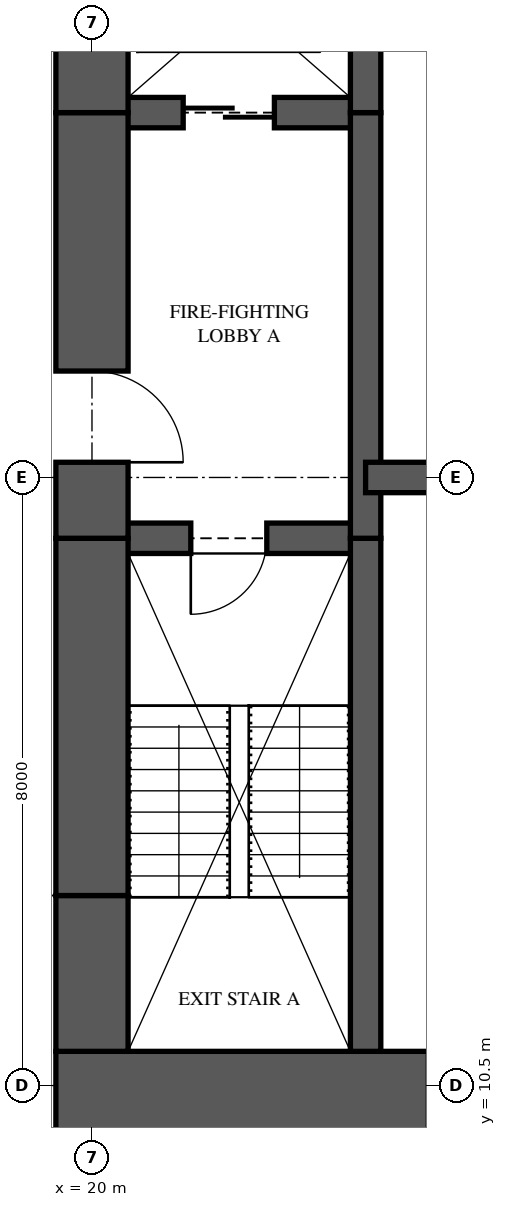
"""IFC4 building model, lengths in metres.
Left out: names, types, materials, properties, quantities, classifications, styles, units other than length and angle.
Written with IfcOpenShell. Run it as: python <this file> out.ifc"""

import sys

from ifc_helpers import new_model, si_unit, direction, frame, frame_2d, origin, place, context, subcontext, project, spatial, rectangle, extrude, element, fill, save


model = new_model("IFC4")
c1 = context("Model", 3, precision=1e-05, world=origin(), true_north=direction((0.0, 1.0)))
c2 = subcontext(c1, "Body", "Model", "MODEL_VIEW")
j1 = project(units=[si_unit("LENGTHUNIT", "METRE"), si_unit("PLANEANGLEUNIT", "RADIAN")], contexts=[c1])
p1 = place(None, origin())
s1 = spatial("IfcSite", under=j1, at=p1, CompositionType="ELEMENT")
p2 = place(p1, origin())
s2 = spatial("IfcBuilding", under=s1, at=p2, CompositionType="ELEMENT")
p3 = place(p2, frame((0.0, 0.0, 54.5)))
s3 = spatial("IfcBuildingStorey", under=s2, at=p3, CompositionType="ELEMENT", Elevation=54.5)
p4 = place(p3, frame((19.525, 10.125, 0.0), z_axis=(0.0, 0.0, 1.0), x_axis=(1.0, 0.0, 0.0)))
e1 = element("IfcWall", 1, at=p4, inside=s3, PredefinedType="SHEAR", context=c2, shape_type="SweptSolid", body=[
    extrude(rectangle(XDim=6.475, YDim=1.65, at=frame_2d((3.238, 0.0))), origin(), (0.0, 0.0, 1.0), 3.35),
])
p5 = place(p4, frame((4.9, 0.0, 0.0)))
e2 = element("IfcOpeningElement", 2, at=p5, cuts=e1, PredefinedType="OPENING", context=c2, shape_type="SweptSolid", body=[
    extrude(rectangle(XDim=0.75, YDim=2.1, at=frame_2d((0.375, 1.05))), frame((0.0, 0.835, 0.0), z_axis=(0.0, -1.0, 0.0), x_axis=(1.0, 0.0, 0.0)), (0.0, 0.0, 1.0), 1.67),
])
p6 = place(p3, frame((20.0, 26.05, 0.0), z_axis=(0.0, 0.0, 1.0), x_axis=(0.0, -1.0, 0.0)))
e3 = element("IfcWall", 3, at=p6, inside=s3, PredefinedType="SHEAR", context=c2, shape_type="SweptSolid", body=[
    extrude(rectangle(XDim=2.75, YDim=0.95, at=frame_2d((1.375, 0.0))), origin(), (0.0, 0.0, 1.0), 3.35),
])
p7 = place(p3, frame((20.0, 23.3, 0.0), z_axis=(0.0, 0.0, 1.0), x_axis=(0.0, -1.0, 0.0)))
e4 = element("IfcWall", 4, at=p7, inside=s3, PredefinedType="SHEAR", context=c2, shape_type="SweptSolid", body=[
    extrude(rectangle(XDim=5.6, YDim=0.95, at=frame_2d((2.8, 0.0))), origin(), (0.0, 0.0, 1.0), 3.35),
])
p8 = place(p7, frame((3.4, 0.0, 0.0)))
e5 = element("IfcOpeningElement", 5, at=p8, cuts=e4, PredefinedType="OPENING", context=c2, shape_type="SweptSolid", body=[
    extrude(rectangle(XDim=1.2, YDim=2.2, at=frame_2d((0.6, 1.1))), frame((0.0, 0.485, 0.0), z_axis=(0.0, -1.0, 0.0), x_axis=(1.0, 0.0, 0.0)), (0.0, 0.0, 1.0), 0.97),
])
p9 = place(p3, frame((20.0, 17.7, 0.0), z_axis=(0.0, 0.0, 1.0), x_axis=(0.0, -1.0, 0.0)))
e6 = element("IfcWall", 6, at=p9, inside=s3, PredefinedType="SHEAR", context=c2, shape_type="SweptSolid", body=[
    extrude(rectangle(XDim=4.7, YDim=0.95, at=frame_2d((2.35, 0.0))), origin(), (0.0, 0.0, 1.0), 3.35),
])
p10 = place(p3, frame((20.0, 13.0, 0.0), z_axis=(0.0, 0.0, 1.0), x_axis=(0.0, -1.0, 0.0)))
e7 = element("IfcWall", 7, at=p10, inside=s3, PredefinedType="SHEAR", context=c2, shape_type="SweptSolid", body=[
    extrude(rectangle(XDim=2.05, YDim=0.95, at=frame_2d((1.025, 0.0))), origin(), (0.0, 0.0, 1.0), 3.35),
])
p11 = place(p3, frame((23.6, 10.95, 0.0), z_axis=(0.0, 0.0, 1.0), x_axis=(0.0, 1.0, 0.0)))
e8 = element("IfcWall", 8, at=p11, inside=s3, PredefinedType="SHEAR", context=c2, shape_type="SweptSolid", body=[
    extrude(rectangle(XDim=6.75, YDim=0.4, at=frame_2d((3.375, 0.0))), origin(), (0.0, 0.0, 1.0), 3.35),
])
p12 = place(p3, frame((23.6, 17.7, 0.0), z_axis=(0.0, 0.0, 1.0), x_axis=(0.0, 1.0, 0.0)))
e9 = element("IfcWall", 9, at=p12, inside=s3, PredefinedType="SHEAR", context=c2, shape_type="SweptSolid", body=[
    extrude(rectangle(XDim=5.6, YDim=0.4, at=frame_2d((2.8, 0.0))), origin(), (0.0, 0.0, 1.0), 3.35),
])
p13 = place(p3, frame((23.6, 23.3, 0.0), z_axis=(0.0, 0.0, 1.0), x_axis=(0.0, 1.0, 0.0)))
e10 = element("IfcWall", 10, at=p13, inside=s3, PredefinedType="SHEAR", context=c2, shape_type="SweptSolid", body=[
    extrude(rectangle(XDim=2.75, YDim=0.4, at=frame_2d((1.375, 0.0))), origin(), (0.0, 0.0, 1.0), 3.35),
])
p14 = place(p3, frame((20.0, 17.7, 0.0), z_axis=(0.0, 0.0, 1.0), x_axis=(1.0, 0.0, 0.0)))
e11 = element("IfcWall", 11, at=p14, inside=s3, PredefinedType="SHEAR", context=c2, shape_type="SweptSolid", body=[
    extrude(rectangle(XDim=3.6, YDim=0.4, at=frame_2d((1.8, 0.0))), origin(), (0.0, 0.0, 1.0), 3.35),
])
p15 = place(p14, frame((1.3, 0.0, 0.0)))
e12 = element("IfcOpeningElement", 12, at=p15, cuts=e11, PredefinedType="OPENING", context=c2, shape_type="SweptSolid", body=[
    extrude(rectangle(XDim=1.0, YDim=2.1, at=frame_2d((0.5, 1.05))), frame((0.0, 0.21, 0.0), z_axis=(0.0, -1.0, 0.0), x_axis=(1.0, 0.0, 0.0)), (0.0, 0.0, 1.0), 0.42),
])
p16 = place(p3, frame((20.0, 23.3, 0.0), z_axis=(0.0, 0.0, 1.0), x_axis=(1.0, 0.0, 0.0)))
e13 = element("IfcWall", 13, at=p16, inside=s3, PredefinedType="SHEAR", context=c2, shape_type="SweptSolid", body=[
    extrude(rectangle(XDim=3.6, YDim=0.4, at=frame_2d((1.8, 0.0))), origin(), (0.0, 0.0, 1.0), 3.35),
])
p17 = place(p16, frame((1.2, 0.0, 0.0)))
e14 = element("IfcOpeningElement", 14, at=p17, cuts=e13, PredefinedType="OPENING", context=c2, shape_type="SweptSolid", body=[
    extrude(rectangle(XDim=1.2, YDim=2.1, at=frame_2d((0.6, 1.05))), frame((0.0, 0.21, 0.0), z_axis=(0.0, -1.0, 0.0), x_axis=(1.0, 0.0, 0.0)), (0.0, 0.0, 1.0), 0.42),
])
p18 = place(p3, frame((23.6, 18.5, 0.0), z_axis=(0.0, 0.0, 1.0), x_axis=(1.0, 0.0, 0.0)))
e15 = element("IfcWall", 15, at=p18, inside=s3, PredefinedType="SHEAR", context=c2, shape_type="SweptSolid", body=[
    extrude(rectangle(XDim=2.4, YDim=0.4, at=frame_2d((1.2, 0.0))), origin(), (0.0, 0.0, 1.0), 3.35),
])
p19 = place(p15, frame((1.0, 0.0, 0.0), z_axis=(0.0, 0.0, 1.0), x_axis=(-1.0, 0.0, 0.0)))
e16 = element("IfcDoor", 16, at=p19, inside=s3, OperationType="SINGLE_SWING_RIGHT", PredefinedType="DOOR", context=c2, shape_type="SweptSolid", body=[
    extrude(rectangle(XDim=1.0, YDim=2.1, at=frame_2d((0.5, 1.05))), frame((0.0, 0.025, 0.0), z_axis=(0.0, -1.0, 0.0), x_axis=(1.0, 0.0, 0.0)), (0.0, 0.0, 1.0), 0.05),
])
fill(e12, e16)
p20 = place(p8, origin())
e17 = element("IfcDoor", 17, at=p20, inside=s3, OperationType="SINGLE_SWING_RIGHT", PredefinedType="DOOR", context=c2, shape_type="SweptSolid", body=[
    extrude(rectangle(XDim=1.2, YDim=2.2, at=frame_2d((0.6, 1.1))), frame((0.0, 0.025, 0.0), z_axis=(0.0, -1.0, 0.0), x_axis=(1.0, 0.0, 0.0)), (0.0, 0.0, 1.0), 0.05),
])
fill(e5, e17)
p21 = place(p17, origin())
e18 = element("IfcDoor", 18, at=p21, inside=s3, OperationType="SLIDING_TO_LEFT", PredefinedType="DOOR", context=c2, shape_type="SweptSolid", body=[
    extrude(rectangle(XDim=1.2, YDim=2.1, at=frame_2d((0.6, 1.05))), frame((0.0, 0.025, 0.0), z_axis=(0.0, -1.0, 0.0), x_axis=(1.0, 0.0, 0.0)), (0.0, 0.0, 1.0), 0.05),
])
fill(e14, e18)
save(model, sys.argv[1])
